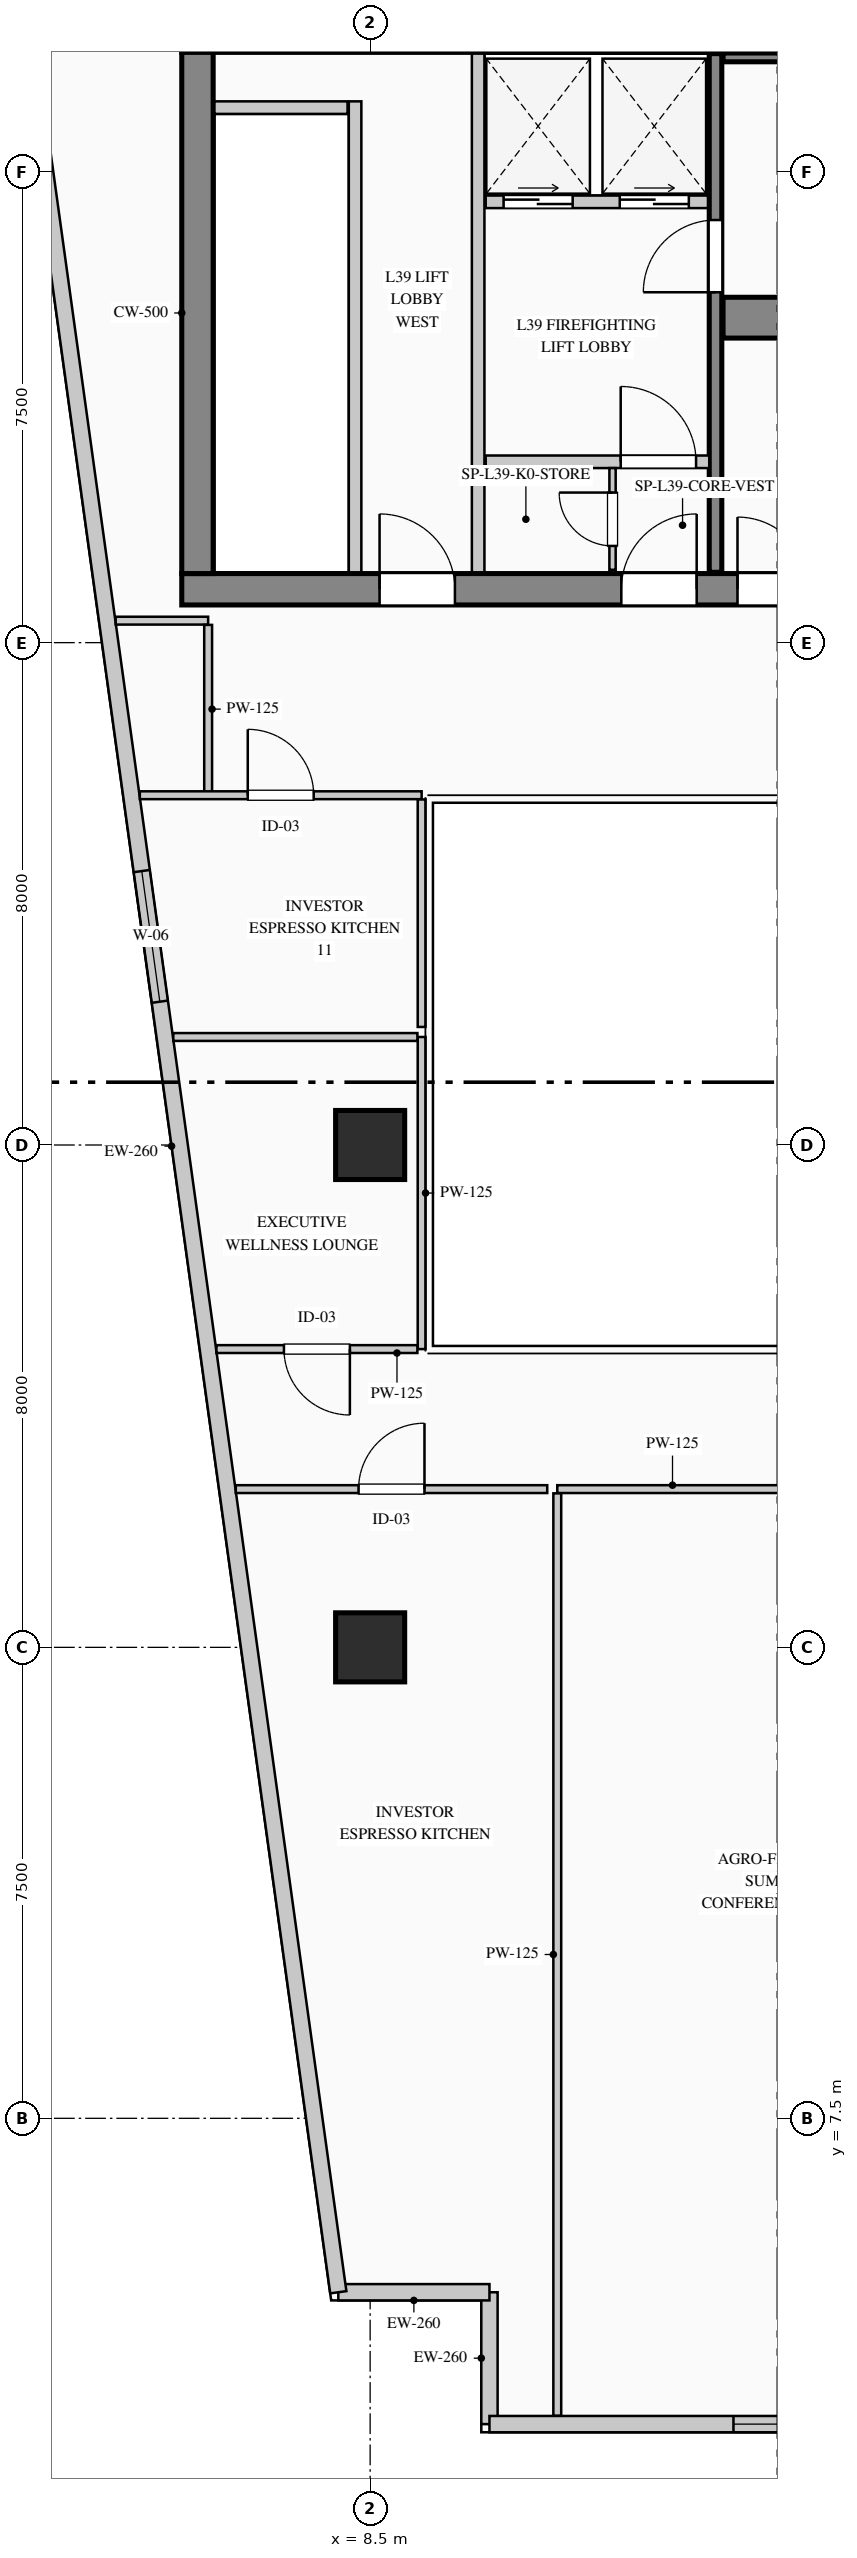
"""IFC4 building model, lengths in metres.
Left out: names, types, materials, properties, quantities, classifications, styles, units other than length and angle.
Written with IfcOpenShell. Run it as: python <this file> out.ifc"""

import sys

from ifc_helpers import new_model, si_unit, direction, frame, frame_2d, origin, origin_2d, place, context, subcontext, project, spatial, rectangle, extrude, element, fill, save


model = new_model("IFC4")
c1 = context("Model", 3, precision=1e-05, world=origin(), true_north=direction((0.0, 1.0)))
c2 = subcontext(c1, "Body", "Model", "MODEL_VIEW")
j1 = project(units=[si_unit("LENGTHUNIT", "METRE"), si_unit("PLANEANGLEUNIT", "RADIAN")], contexts=[c1])
p1 = place(None, origin())
s1 = spatial("IfcSite", under=j1, at=p1, CompositionType="ELEMENT")
p2 = place(p1, origin())
s2 = spatial("IfcBuilding", under=s1, at=p2, CompositionType="ELEMENT")
p3 = place(p2, frame((0.0, 0.0, 166.7)))
s3 = spatial("IfcBuildingStorey", under=s2, at=p3, CompositionType="ELEMENT", Elevation=166.7)
p4 = place(p3, frame((5.5, 31.85, 0.0), z_axis=(0.0, 0.0, 1.0), x_axis=(1.0, 0.0, 0.0)))
e1 = element("IfcWall", 1, at=p4, inside=s3, PredefinedType="SHEAR", context=c2, shape_type="SweptSolid", body=[
    extrude(rectangle(XDim=17.85, YDim=0.5, at=frame_2d((8.925, 0.0))), origin(), (0.0, 0.0, 1.0), 3.95),
])
p5 = place(p4, frame((3.15, 0.0, 0.0)))
e2 = element("IfcOpeningElement", 2, at=p5, cuts=e1, PredefinedType="OPENING", context=c2, shape_type="SweptSolid", body=[
    extrude(rectangle(XDim=1.2, YDim=2.2, at=frame_2d((0.6, 1.1))), frame((0.0, 0.26, 0.0), z_axis=(0.0, -1.0, 0.0), x_axis=(1.0, 0.0, 0.0)), (0.0, 0.0, 1.0), 0.52),
])
p6 = place(p4, frame((7.0, 0.0, 0.0)))
e3 = element("IfcOpeningElement", 3, at=p6, cuts=e1, PredefinedType="OPENING", context=c2, shape_type="SweptSolid", body=[
    extrude(rectangle(XDim=1.2, YDim=2.2, at=frame_2d((0.6, 1.1))), frame((0.0, 0.26, 0.0), z_axis=(0.0, -1.0, 0.0), x_axis=(1.0, 0.0, 0.0)), (0.0, 0.0, 1.0), 0.52),
])
p7 = place(p4, frame((8.85, 0.0, 0.0)))
e4 = element("IfcOpeningElement", 4, at=p7, cuts=e1, PredefinedType="OPENING", context=c2, shape_type="SweptSolid", body=[
    extrude(rectangle(XDim=1.15, YDim=2.2, at=frame_2d((0.575, 1.1))), frame((0.0, 0.26, 0.0), z_axis=(0.0, -1.0, 0.0), x_axis=(1.0, 0.0, 0.0)), (0.0, 0.0, 1.0), 0.52),
])
p8 = place(p4, frame((15.95, 0.0, 0.0)))
e5 = element("IfcOpeningElement", 5, at=p8, cuts=e1, PredefinedType="OPENING", context=c2, shape_type="SweptSolid", body=[
    extrude(rectangle(XDim=1.2, YDim=2.2, at=frame_2d((0.6, 1.1))), frame((0.0, 0.26, 0.0), z_axis=(0.0, -1.0, 0.0), x_axis=(1.0, 0.0, 0.0)), (0.0, 0.0, 1.0), 0.52),
])
p9 = place(p3, frame((5.75, 32.1, 0.0), z_axis=(0.0, 0.0, 1.0), x_axis=(0.0, 1.0, 0.0)))
e6 = element("IfcWall", 6, at=p9, inside=s3, PredefinedType="SHEAR", context=c2, shape_type="SweptSolid", body=[
    extrude(rectangle(XDim=8.3, YDim=0.5, at=frame_2d((4.15, 0.0))), origin(), (0.0, 0.0, 1.0), 3.95),
])
p10 = place(p3, frame((14.0, 32.12, 0.0), z_axis=(0.0, 0.0, 1.0), x_axis=(0.0, 1.0, 0.0)))
e7 = element("IfcWall", 7, at=p10, inside=s3, PredefinedType="SHEAR", context=c2, shape_type="SweptSolid", body=[
    extrude(rectangle(XDim=8.26, YDim=0.2, at=frame_2d((4.13, 0.0))), origin(), (0.0, 0.0, 1.0), 3.95),
])
p11 = place(p10, frame((4.46, 0.0, 0.0)))
e8 = element("IfcOpeningElement", 8, at=p11, cuts=e7, PredefinedType="OPENING", context=c2, shape_type="SweptSolid", body=[
    extrude(rectangle(XDim=1.15, YDim=2.2, at=frame_2d((0.575, 1.1))), frame((0.0, 0.11, 0.0), z_axis=(0.0, -1.0, 0.0), x_axis=(1.0, 0.0, 0.0)), (0.0, 0.0, 1.0), 0.22),
])
p12 = place(p3, frame((14.12, 36.175, 0.0), z_axis=(0.0, 0.0, 1.0), x_axis=(1.0, 0.0, 0.0)))
e9 = element("IfcWall", 9, at=p12, inside=s3, PredefinedType="SHEAR", context=c2, shape_type="SweptSolid", body=[
    extrude(rectangle(XDim=7.01, YDim=0.65, at=frame_2d((3.505, 0.0))), origin(), (0.0, 0.0, 1.0), 3.95),
])
p13 = place(p3, frame((14.12, 40.32, 0.0), z_axis=(0.0, 0.0, 1.0), x_axis=(1.0, 0.0, 0.0)))
e10 = element("IfcWall", 10, at=p13, inside=s3, PredefinedType="SHEAR", context=c2, shape_type="SweptSolid", body=[
    extrude(rectangle(XDim=7.01, YDim=0.14, at=frame_2d((3.505, 0.0))), origin(), (0.0, 0.0, 1.0), 3.95),
])
for number, where, z_axis, x_axis in (
    (11, (8.5, 15.0, 0.0), (0.0, 0.0, 1.0), (1.0, 0.0, 0.0)),
    (12, (8.5, 23.0, 0.0), (0.0, 0.0, 1.0), (1.0, 0.0, 0.0)),
):
    element("IfcColumn", number, at=place(p3, frame(where, z_axis=z_axis, x_axis=x_axis)), inside=s3, PredefinedType="COLUMN", context=c2, shape_type="SweptSolid", body=[
        extrude(rectangle(XDim=1.1, YDim=1.1, at=origin_2d()), origin(), (0.0, 0.0, 1.0), 3.95),
    ])
p14 = place(p3, frame((10.4, 2.63, 0.0), z_axis=(0.0, 0.0, 1.0), x_axis=(0.0, 1.0, 0.0)))
e13 = element("IfcWall", 13, at=p14, inside=s3, PredefinedType="STANDARD", context=c2, shape_type="SweptSolid", body=[
    extrude(rectangle(XDim=2.1, YDim=0.26, at=frame_2d((1.05, 0.0))), origin(), (0.0, 0.0, 1.0), 3.69),
])
p15 = place(p3, frame((10.4, 4.73, 0.0), z_axis=(0.0, 0.0, 1.0), x_axis=(-1.0, 0.0, 0.0)))
e14 = element("IfcWall", 14, at=p15, inside=s3, PredefinedType="STANDARD", context=c2, shape_type="SweptSolid", body=[
    extrude(rectangle(XDim=2.407, YDim=0.26, at=frame_2d((1.204, 0.0))), origin(), (0.0, 0.0, 1.0), 3.69),
])
p16 = place(p3, frame((7.993, 4.73, 0.0), z_axis=(0.0, 0.0, 1.0), x_axis=(-0.136989009016, 0.990572567462, 0.0)))
e15 = element("IfcWall", 15, at=p16, inside=s3, PredefinedType="STANDARD", context=c2, shape_type="SweptSolid", body=[
    extrude(rectangle(XDim=36.888, YDim=0.26, at=frame_2d((18.444, 0.0))), origin(), (0.0, 0.0, 1.0), 3.69),
])
p17 = place(p16, frame((20.748, 0.0, 0.9)))
e16 = element("IfcOpeningElement", 16, at=p17, cuts=e15, PredefinedType="OPENING", context=c2, shape_type="SweptSolid", body=[
    extrude(rectangle(XDim=2.1, YDim=2.0, at=frame_2d((1.05, 1.0))), frame((0.0, 0.14, 0.0), z_axis=(0.0, -1.0, 0.0), x_axis=(1.0, 0.0, 0.0)), (0.0, 0.0, 1.0), 0.28),
])
p18 = place(p3, frame((24.11, 2.63, 0.0), z_axis=(0.0, 0.0, 1.0), x_axis=(-1.0, 0.0, 0.0)))
e17 = element("IfcWall", 17, at=p18, inside=s3, PredefinedType="STANDARD", context=c2, shape_type="SweptSolid", body=[
    extrude(rectangle(XDim=13.71, YDim=0.26, at=frame_2d((6.855, 0.0))), origin(), (0.0, 0.0, 1.0), 3.69),
])
p19 = place(p18, frame((7.724, 0.0, 0.9)))
e18 = element("IfcOpeningElement", 18, at=p19, cuts=e17, PredefinedType="OPENING", context=c2, shape_type="SweptSolid", body=[
    extrude(rectangle(XDim=2.1, YDim=2.0, at=frame_2d((1.05, 1.0))), frame((0.0, 0.14, 0.0), z_axis=(0.0, -1.0, 0.0), x_axis=(1.0, 0.0, 0.0)), (0.0, 0.0, 1.0), 0.28),
])
p20 = place(p3, frame((8.26, 32.12, 0.0), z_axis=(0.0, 0.0, 1.0), x_axis=(0.0, 1.0, 0.0)))
e19 = element("IfcWall", 19, at=p20, inside=s3, PredefinedType="PARTITIONING", context=c2, shape_type="SweptSolid", body=[
    extrude(rectangle(XDim=7.5, YDim=0.2, at=frame_2d((3.75, 0.0))), origin(), (0.0, 0.0, 1.0), 3.69),
])
p21 = place(p3, frame((6.02, 39.52, 0.0), z_axis=(0.0, 0.0, 1.0), x_axis=(1.0, 0.0, 0.0)))
e20 = element("IfcWall", 20, at=p21, inside=s3, PredefinedType="PARTITIONING", context=c2, shape_type="SweptSolid", body=[
    extrude(rectangle(XDim=2.12, YDim=0.2, at=frame_2d((1.06, 0.0))), origin(), (0.0, 0.0, 1.0), 3.69),
])
p22 = place(p3, frame((10.22, 32.12, 0.0), z_axis=(0.0, 0.0, 1.0), x_axis=(0.0, 1.0, 0.0)))
e21 = element("IfcWall", 21, at=p22, inside=s3, PredefinedType="PARTITIONING", context=c2, shape_type="SweptSolid", body=[
    extrude(rectangle(XDim=8.26, YDim=0.2, at=frame_2d((4.13, 0.0))), origin(), (0.0, 0.0, 1.0), 3.69),
])
p23 = place(p3, frame((10.34, 38.02, 0.0), z_axis=(0.0, 0.0, 1.0), x_axis=(1.0, 0.0, 0.0)))
e22 = element("IfcWall", 22, at=p23, inside=s3, PredefinedType="PARTITIONING", context=c2, shape_type="SweptSolid", body=[
    extrude(rectangle(XDim=3.54, YDim=0.2, at=frame_2d((1.77, 0.0))), origin(), (0.0, 0.0, 1.0), 3.69),
])
p24 = place(p23, frame((0.285, 0.0, 0.0)))
e23 = element("IfcOpeningElement", 23, at=p24, cuts=e22, PredefinedType="OPENING", context=c2, shape_type="SweptSolid", body=[
    extrude(rectangle(XDim=1.1, YDim=2.2, at=frame_2d((0.55, 1.1))), frame((0.0, 0.11, 0.0), z_axis=(0.0, -1.0, 0.0), x_axis=(1.0, 0.0, 0.0)), (0.0, 0.0, 1.0), 0.22),
])
p25 = place(p23, frame((2.135, 0.0, 0.0)))
e24 = element("IfcOpeningElement", 24, at=p25, cuts=e22, PredefinedType="OPENING", context=c2, shape_type="SweptSolid", body=[
    extrude(rectangle(XDim=1.1, YDim=2.2, at=frame_2d((0.55, 1.1))), frame((0.0, 0.11, 0.0), z_axis=(0.0, -1.0, 0.0), x_axis=(1.0, 0.0, 0.0)), (0.0, 0.0, 1.0), 0.22),
])
p26 = place(p3, frame((10.34, 33.88, 0.0), z_axis=(0.0, 0.0, 1.0), x_axis=(1.0, 0.0, 0.0)))
e25 = element("IfcWall", 25, at=p26, inside=s3, PredefinedType="PARTITIONING", context=c2, shape_type="SweptSolid", body=[
    extrude(rectangle(XDim=3.56, YDim=0.2, at=frame_2d((1.78, 0.0))), origin(), (0.0, 0.0, 1.0), 3.69),
])
p27 = place(p26, frame((2.15, 0.0, 0.0)))
e26 = element("IfcOpeningElement", 26, at=p27, cuts=e25, PredefinedType="OPENING", context=c2, shape_type="SweptSolid", body=[
    extrude(rectangle(XDim=1.2, YDim=2.2, at=frame_2d((0.6, 1.1))), frame((0.0, 0.11, 0.0), z_axis=(0.0, -1.0, 0.0), x_axis=(1.0, 0.0, 0.0)), (0.0, 0.0, 1.0), 0.22),
])
p28 = place(p3, frame((12.36, 32.16, 0.0), z_axis=(0.0, 0.0, 1.0), x_axis=(0.0, 1.0, 0.0)))
e27 = element("IfcWall", 27, at=p28, inside=s3, PredefinedType="PARTITIONING", context=c2, shape_type="SweptSolid", body=[
    extrude(rectangle(XDim=1.62, YDim=0.1, at=frame_2d((0.81, 0.0))), origin(), (0.0, 0.0, 1.0), 3.69),
])
p29 = place(p28, frame((0.38, 0.0, 0.0)))
e28 = element("IfcOpeningElement", 28, at=p29, cuts=e27, PredefinedType="OPENING", context=c2, shape_type="SweptSolid", body=[
    extrude(rectangle(XDim=0.85, YDim=2.1, at=frame_2d((0.425, 1.05))), frame((0.0, 0.06, 0.0), z_axis=(0.0, -1.0, 0.0), x_axis=(1.0, 0.0, 0.0)), (0.0, 0.0, 1.0), 0.12),
])
p30 = place(p3, frame((11.48, 17.52, 0.0), z_axis=(0.0, 0.0, 1.0), x_axis=(1.0, 0.0, 0.0)))
e29 = element("IfcWall", 29, at=p30, inside=s3, PredefinedType="PARTITIONING", context=c2, shape_type="SweptSolid", body=[
    extrude(rectangle(XDim=9.24, YDim=0.125, at=frame_2d((4.62, 0.0))), origin(), (0.0, 0.0, 1.0), 3.69),
])
p31 = place(p30, frame((4.095, 0.0, 0.0)))
e30 = element("IfcOpeningElement", 30, at=p31, cuts=e29, PredefinedType="OPENING", context=c2, shape_type="SweptSolid", body=[
    extrude(rectangle(XDim=1.05, YDim=2.15, at=frame_2d((0.525, 1.075))), frame((0.0, 0.073, 0.0), z_axis=(0.0, -1.0, 0.0), x_axis=(1.0, 0.0, 0.0)), (0.0, 0.0, 1.0), 0.145),
])
p32 = place(p3, frame((11.48, 2.765, 0.0), z_axis=(0.0, 0.0, 1.0), x_axis=(0.0, 1.0, 0.0)))
e31 = element("IfcWall", 31, at=p32, inside=s3, PredefinedType="PARTITIONING", context=c2, shape_type="SweptSolid", body=[
    extrude(rectangle(XDim=14.688, YDim=0.125, at=frame_2d((7.344, 0.0))), origin(), (0.0, 0.0, 1.0), 3.69),
])
p33 = place(p3, frame((6.36, 17.52, 0.0), z_axis=(0.0, 0.0, 1.0), x_axis=(1.0, 0.0, 0.0)))
e32 = element("IfcWall", 32, at=p33, inside=s3, PredefinedType="PARTITIONING", context=c2, shape_type="SweptSolid", body=[
    extrude(rectangle(XDim=4.96, YDim=0.125, at=frame_2d((2.48, 0.0))), origin(), (0.0, 0.0, 1.0), 3.69),
])
p34 = place(p33, frame((1.955, 0.0, 0.0)))
e33 = element("IfcOpeningElement", 33, at=p34, cuts=e32, PredefinedType="OPENING", context=c2, shape_type="SweptSolid", body=[
    extrude(rectangle(XDim=1.05, YDim=2.15, at=frame_2d((0.525, 1.075))), frame((0.0, 0.073, 0.0), z_axis=(0.0, -1.0, 0.0), x_axis=(1.0, 0.0, 0.0)), (0.0, 0.0, 1.0), 0.145),
])
p35 = place(p3, frame((9.32, 24.72, 0.0), z_axis=(0.0, 0.0, 1.0), x_axis=(0.0, -1.0, 0.0)))
e34 = element("IfcWall", 34, at=p35, inside=s3, PredefinedType="PARTITIONING", context=c2, shape_type="SweptSolid", body=[
    extrude(rectangle(XDim=4.97, YDim=0.125, at=frame_2d((2.485, 0.0))), origin(), (0.0, 0.0, 1.0), 3.375),
])
p36 = place(p3, frame((9.252, 19.75, 0.0), z_axis=(0.0, 0.0, 1.0), x_axis=(-1.0, 0.0, 0.0)))
e35 = element("IfcWall", 35, at=p36, inside=s3, PredefinedType="PARTITIONING", context=c2, shape_type="SweptSolid", body=[
    extrude(rectangle(XDim=3.2, YDim=0.125, at=frame_2d((1.6, 0.0))), origin(), (0.0, 0.0, 1.0), 3.69),
])
p37 = place(p36, frame((1.075, 0.0, 0.0)))
e36 = element("IfcOpeningElement", 36, at=p37, cuts=e35, PredefinedType="OPENING", context=c2, shape_type="SweptSolid", body=[
    extrude(rectangle(XDim=1.05, YDim=2.15, at=frame_2d((0.525, 1.075))), frame((0.0, 0.073, 0.0), z_axis=(0.0, -1.0, 0.0), x_axis=(1.0, 0.0, 0.0)), (0.0, 0.0, 1.0), 0.145),
])
p38 = place(p3, frame((5.365, 24.72, 0.0), z_axis=(0.0, 0.0, 1.0), x_axis=(1.0, 0.0, 0.0)))
e37 = element("IfcWall", 37, at=p38, inside=s3, PredefinedType="PARTITIONING", context=c2, shape_type="SweptSolid", body=[
    extrude(rectangle(XDim=3.888, YDim=0.125, at=frame_2d((1.944, 0.0))), origin(), (0.0, 0.0, 1.0), 3.69),
])
p39 = place(p3, frame((4.448, 31.35, 0.0), z_axis=(0.0, 0.0, 1.0), x_axis=(1.0, 0.0, 0.0)))
e38 = element("IfcWall", 38, at=p39, inside=s3, PredefinedType="PARTITIONING", context=c2, shape_type="SweptSolid", body=[
    extrude(rectangle(XDim=1.472, YDim=0.125, at=frame_2d((0.736, 0.0))), origin(), (0.0, 0.0, 1.0), 3.69),
])
p40 = place(p3, frame((5.92, 31.282, 0.0), z_axis=(0.0, 0.0, 1.0), x_axis=(0.0, -1.0, 0.0)))
e39 = element("IfcWall", 39, at=p40, inside=s3, PredefinedType="PARTITIONING", context=c2, shape_type="SweptSolid", body=[
    extrude(rectangle(XDim=2.682, YDim=0.125, at=frame_2d((1.341, 0.0))), origin(), (0.0, 0.0, 1.0), 3.69),
])
p41 = place(p3, frame((4.832, 28.57, 0.0), z_axis=(0.0, 0.0, 1.0), x_axis=(1.0, 0.0, 0.0)))
e40 = element("IfcWall", 40, at=p41, inside=s3, PredefinedType="PARTITIONING", context=c2, shape_type="SweptSolid", body=[
    extrude(rectangle(XDim=4.488, YDim=0.125, at=frame_2d((2.244, 0.0))), origin(), (0.0, 0.0, 1.0), 3.69),
])
p42 = place(p41, frame((1.719, 0.0, 0.0)))
e41 = element("IfcOpeningElement", 41, at=p42, cuts=e40, PredefinedType="OPENING", context=c2, shape_type="SweptSolid", body=[
    extrude(rectangle(XDim=1.05, YDim=2.15, at=frame_2d((0.525, 1.075))), frame((0.0, 0.073, 0.0), z_axis=(0.0, -1.0, 0.0), x_axis=(1.0, 0.0, 0.0)), (0.0, 0.0, 1.0), 0.145),
])
p43 = place(p3, frame((9.32, 28.502, 0.0), z_axis=(0.0, 0.0, 1.0), x_axis=(0.0, -1.0, 0.0)))
e42 = element("IfcWall", 42, at=p43, inside=s3, PredefinedType="PARTITIONING", context=c2, shape_type="SweptSolid", body=[
    extrude(rectangle(XDim=3.623, YDim=0.125, at=frame_2d((1.811, 0.0))), origin(), (0.0, 0.0, 1.0), 3.375),
])
p44 = place(p17, origin())
e43 = element("IfcWindow", 43, at=p44, inside=s3, PartitioningType="DOUBLE_PANEL_VERTICAL", PredefinedType="WINDOW", context=c2, shape_type="SweptSolid", body=[
    extrude(rectangle(XDim=2.1, YDim=2.0, at=frame_2d((1.05, 1.0))), frame((0.0, 0.03, 0.0), z_axis=(0.0, -1.0, 0.0), x_axis=(1.0, 0.0, 0.0)), (0.0, 0.0, 1.0), 0.06),
])
fill(e16, e43)
p45 = place(p19, origin())
e44 = element("IfcWindow", 44, at=p45, inside=s3, PartitioningType="DOUBLE_PANEL_VERTICAL", PredefinedType="WINDOW", context=c2, shape_type="SweptSolid", body=[
    extrude(rectangle(XDim=2.1, YDim=2.0, at=frame_2d((1.05, 1.0))), frame((0.0, 0.03, 0.0), z_axis=(0.0, -1.0, 0.0), x_axis=(1.0, 0.0, 0.0)), (0.0, 0.0, 1.0), 0.06),
])
fill(e18, e44)
p46 = place(p5, origin())
e45 = element("IfcDoor", 45, at=p46, inside=s3, OperationType="SINGLE_SWING_LEFT", PredefinedType="DOOR", context=c2, shape_type="SweptSolid", body=[
    extrude(rectangle(XDim=1.2, YDim=2.2, at=frame_2d((0.6, 1.1))), frame((0.0, 0.025, 0.0), z_axis=(0.0, -1.0, 0.0), x_axis=(1.0, 0.0, 0.0)), (0.0, 0.0, 1.0), 0.05),
])
fill(e2, e45)
p47 = place(p6, origin())
e46 = element("IfcDoor", 46, at=p47, inside=s3, OperationType="SINGLE_SWING_RIGHT", PredefinedType="DOOR", context=c2, shape_type="SweptSolid", body=[
    extrude(rectangle(XDim=1.2, YDim=2.2, at=frame_2d((0.6, 1.1))), frame((0.0, 0.025, 0.0), z_axis=(0.0, -1.0, 0.0), x_axis=(1.0, 0.0, 0.0)), (0.0, 0.0, 1.0), 0.05),
])
fill(e3, e46)
p48 = place(p7, origin())
e47 = element("IfcDoor", 47, at=p48, inside=s3, OperationType="SINGLE_SWING_LEFT", PredefinedType="DOOR", context=c2, shape_type="SweptSolid", body=[
    extrude(rectangle(XDim=1.15, YDim=2.2, at=frame_2d((0.575, 1.1))), frame((0.0, 0.025, 0.0), z_axis=(0.0, -1.0, 0.0), x_axis=(1.0, 0.0, 0.0)), (0.0, 0.0, 1.0), 0.05),
])
fill(e4, e47)
p49 = place(p27, origin())
e48 = element("IfcDoor", 48, at=p49, inside=s3, OperationType="SINGLE_SWING_LEFT", PredefinedType="DOOR", context=c2, shape_type="SweptSolid", body=[
    extrude(rectangle(XDim=1.2, YDim=2.2, at=frame_2d((0.6, 1.1))), frame((0.0, 0.025, 0.0), z_axis=(0.0, -1.0, 0.0), x_axis=(1.0, 0.0, 0.0)), (0.0, 0.0, 1.0), 0.05),
])
fill(e26, e48)
p50 = place(p29, origin())
e49 = element("IfcDoor", 49, at=p50, inside=s3, OperationType="SINGLE_SWING_RIGHT", PredefinedType="DOOR", context=c2, shape_type="SweptSolid", body=[
    extrude(rectangle(XDim=0.85, YDim=2.1, at=frame_2d((0.425, 1.05))), frame((0.0, 0.025, 0.0), z_axis=(0.0, -1.0, 0.0), x_axis=(1.0, 0.0, 0.0)), (0.0, 0.0, 1.0), 0.05),
])
fill(e28, e49)
p51 = place(p11, origin())
e50 = element("IfcDoor", 50, at=p51, inside=s3, OperationType="SINGLE_SWING_LEFT", PredefinedType="DOOR", context=c2, shape_type="SweptSolid", body=[
    extrude(rectangle(XDim=1.15, YDim=2.2, at=frame_2d((0.575, 1.1))), frame((0.0, 0.025, 0.0), z_axis=(0.0, -1.0, 0.0), x_axis=(1.0, 0.0, 0.0)), (0.0, 0.0, 1.0), 0.05),
])
fill(e8, e50)
p52 = place(p24, origin())
e51 = element("IfcDoor", 51, at=p52, inside=s3, OperationType="DOUBLE_DOOR_SLIDING", PredefinedType="DOOR", context=c2, shape_type="SweptSolid", body=[
    extrude(rectangle(XDim=1.1, YDim=2.2, at=frame_2d((0.55, 1.1))), frame((0.0, 0.025, 0.0), z_axis=(0.0, -1.0, 0.0), x_axis=(1.0, 0.0, 0.0)), (0.0, 0.0, 1.0), 0.05),
])
fill(e23, e51)
p53 = place(p25, origin())
e52 = element("IfcDoor", 52, at=p53, inside=s3, OperationType="DOUBLE_DOOR_SLIDING", PredefinedType="DOOR", context=c2, shape_type="SweptSolid", body=[
    extrude(rectangle(XDim=1.1, YDim=2.2, at=frame_2d((0.55, 1.1))), frame((0.0, 0.025, 0.0), z_axis=(0.0, -1.0, 0.0), x_axis=(1.0, 0.0, 0.0)), (0.0, 0.0, 1.0), 0.05),
])
fill(e24, e52)
p54 = place(p34, origin())
e53 = element("IfcDoor", 53, at=p54, inside=s3, OperationType="SINGLE_SWING_RIGHT", PredefinedType="DOOR", context=c2, shape_type="SweptSolid", body=[
    extrude(rectangle(XDim=1.05, YDim=2.15, at=frame_2d((0.525, 1.075))), frame((0.0, 0.025, 0.0), z_axis=(0.0, -1.0, 0.0), x_axis=(1.0, 0.0, 0.0)), (0.0, 0.0, 1.0), 0.05),
])
fill(e33, e53)
p55 = place(p37, origin())
e54 = element("IfcDoor", 54, at=p55, inside=s3, OperationType="SINGLE_SWING_LEFT", PredefinedType="DOOR", context=c2, shape_type="SweptSolid", body=[
    extrude(rectangle(XDim=1.05, YDim=2.15, at=frame_2d((0.525, 1.075))), frame((0.0, 0.025, 0.0), z_axis=(0.0, -1.0, 0.0), x_axis=(1.0, 0.0, 0.0)), (0.0, 0.0, 1.0), 0.05),
])
fill(e36, e54)
p56 = place(p42, origin())
e55 = element("IfcDoor", 55, at=p56, inside=s3, OperationType="SINGLE_SWING_LEFT", PredefinedType="DOOR", context=c2, shape_type="SweptSolid", body=[
    extrude(rectangle(XDim=1.05, YDim=2.15, at=frame_2d((0.525, 1.075))), frame((0.0, 0.025, 0.0), z_axis=(0.0, -1.0, 0.0), x_axis=(1.0, 0.0, 0.0)), (0.0, 0.0, 1.0), 0.05),
])
fill(e41, e55)
save(model, sys.argv[1])
